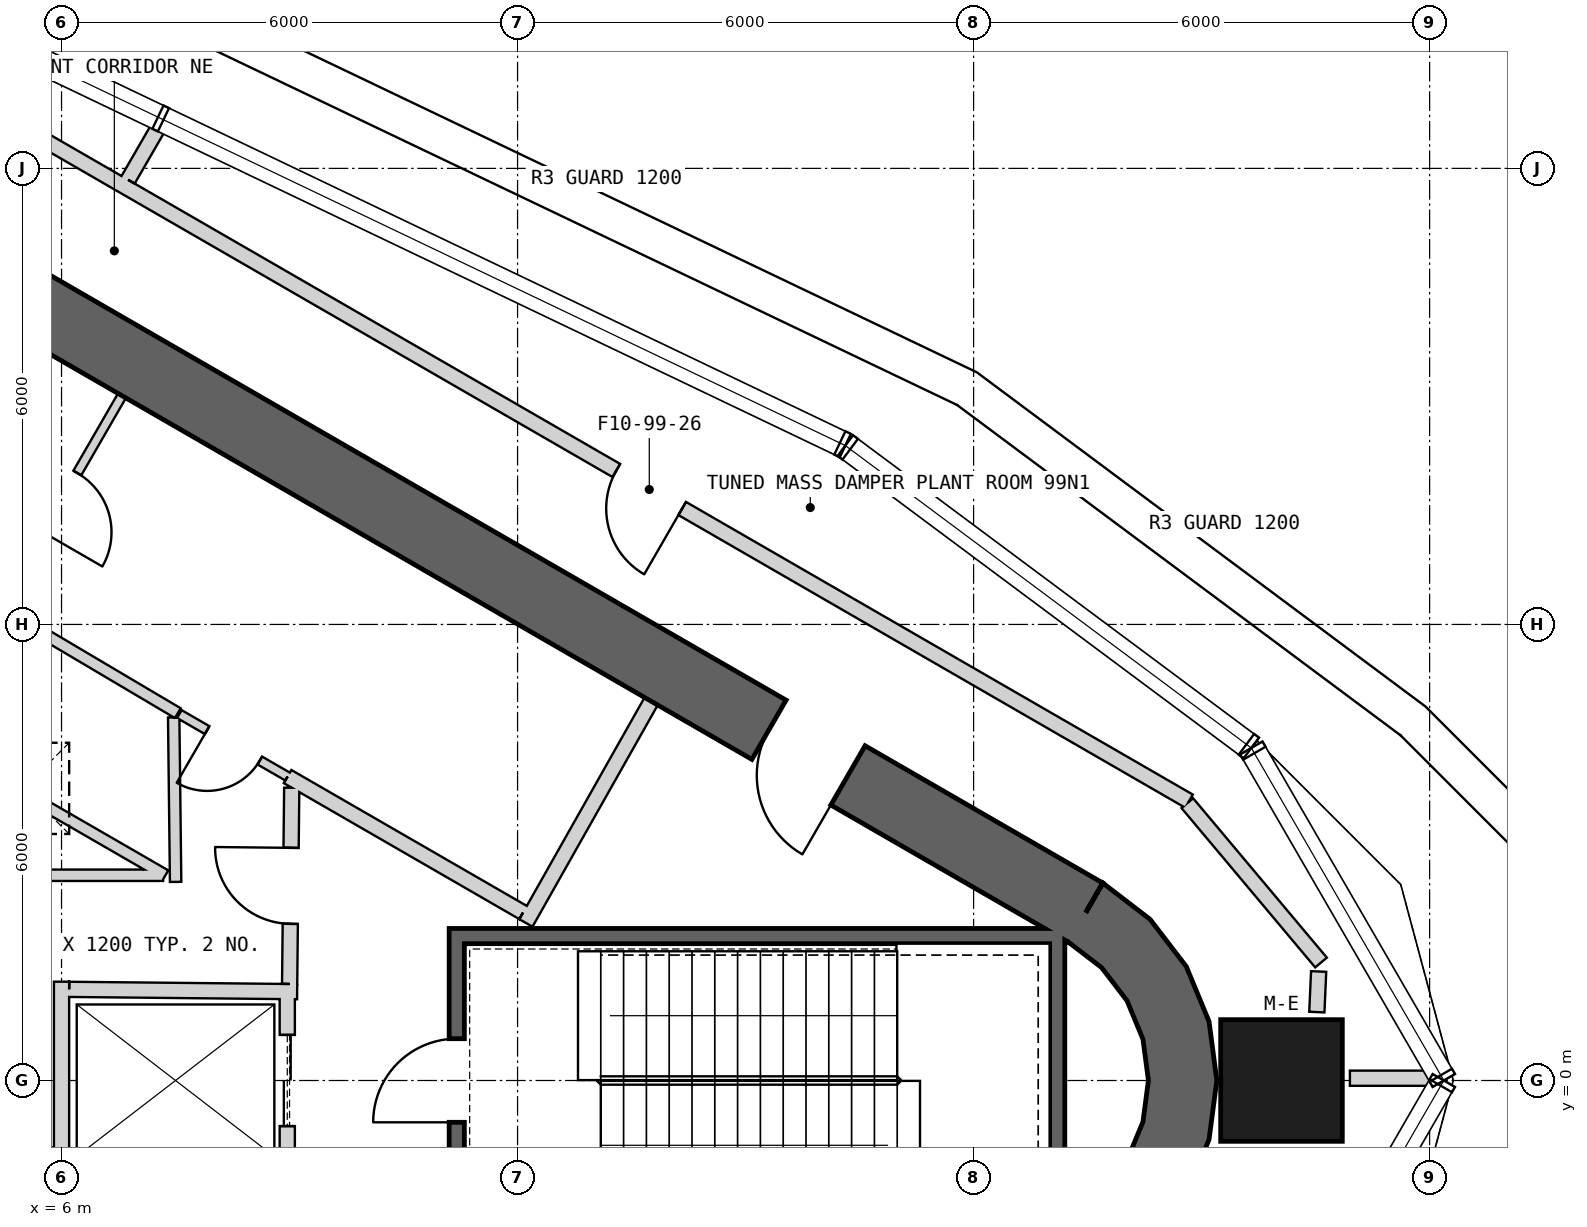
"""IFC4 building model, lengths in metres.
Left out: names, types, materials, properties, quantities, classifications, styles, units other than length and angle.
Written with IfcOpenShell. Run it as: python <this file> out.ifc"""

import sys

from ifc_helpers import new_model, si_unit, direction, frame, frame_2d, origin, origin_2d, place, context, subcontext, project, spatial, polyline, rectangle, outline, extrude, element, fill, save


model = new_model("IFC4")
c1 = context("Model", 3, precision=1e-05, world=origin(), true_north=direction((0.0, 1.0)))
c2 = subcontext(c1, "Body", "Model", "MODEL_VIEW")
j1 = project(units=[si_unit("LENGTHUNIT", "METRE"), si_unit("PLANEANGLEUNIT", "RADIAN")], contexts=[c1])
p1 = place(None, origin())
s1 = spatial("IfcSite", under=j1, at=p1, CompositionType="ELEMENT")
p2 = place(p1, origin())
s2 = spatial("IfcBuilding", under=s1, at=p2, CompositionType="ELEMENT")
p3 = place(p2, frame((0.0, 0.0, 440.3)))
s3 = spatial("IfcBuildingStorey", under=s2, at=p3, CompositionType="ELEMENT", Elevation=440.3)
p4 = place(p3, frame((22.051, 0.0, 0.0), z_axis=(0.0, 0.0, 1.0), x_axis=(1.0, 0.0, 0.0)))
e1 = element("IfcColumn", 1, at=p4, inside=s3, PredefinedType="COLUMN", context=c2, shape_type="SweptSolid", body=[
    extrude(rectangle(XDim=1.6, YDim=1.6, at=origin_2d()), origin(), (0.0, 0.0, 1.0), 4.7),
])
p5 = place(p3, frame((19.475, 2.208, 0.0), z_axis=(0.0, 0.0, 1.0), x_axis=(-0.866028369851, 0.499994862586, 0.0)))
e2 = element("IfcWall", 2, at=p5, inside=s3, PredefinedType="SHEAR", context=c2, shape_type="SweptSolid", body=[
    extrude(rectangle(XDim=31.523, YDim=0.9, at=frame_2d((15.762, 0.0))), origin(), (0.0, 0.0, 1.0), 4.7),
])
p6 = place(p5, frame((3.612, 0.0, 0.0)))
e3 = element("IfcOpeningElement", 3, at=p6, cuts=e2, PredefinedType="OPENING", context=c2, shape_type="SweptSolid", body=[
    extrude(rectangle(XDim=1.2, YDim=2.4, at=frame_2d((0.6, 1.2))), frame((0.0, 0.46, 0.0), z_axis=(0.0, -1.0, 0.0), x_axis=(1.0, 0.0, 0.0)), (0.0, 0.0, 1.0), 0.92),
])
p7 = place(p5, frame((26.712, 0.0, 0.0)))
e4 = element("IfcOpeningElement", 4, at=p7, cuts=e2, PredefinedType="OPENING", context=c2, shape_type="SweptSolid", body=[
    extrude(rectangle(XDim=1.2, YDim=2.4, at=frame_2d((0.6, 1.2))), frame((0.0, 0.46, 0.0), z_axis=(0.0, -1.0, 0.0), x_axis=(1.0, 0.0, 0.0)), (0.0, 0.0, 1.0), 0.92),
])
p8 = place(p3, origin())
e5 = element("IfcWall", 5, at=p8, inside=s3, PredefinedType="SHEAR", context=c2, shape_type="SweptSolid", body=[
    extrude(outline(polyline([(19.7, -2.598), (20.321, -2.121), (20.798, -1.5), (21.098, -0.777), (21.2, 0.0), (21.098, 0.777), (20.798, 1.5), (20.321, 2.121), (19.7, 2.598), (19.25, 1.819), (19.685, 1.485), (20.019, 1.05), (20.229, 0.543), (20.3, 0.0), (20.229, -0.543), (20.019, -1.05), (19.685, -1.485), (19.25, -1.819), (19.7, -2.598)])), origin(), (0.0, 0.0, 1.0), 4.7),
])
p9 = place(p3, frame((19.2, 1.9, -0.25), z_axis=(0.0, 0.0, 1.0), x_axis=(-1.0, 0.0, 0.0)))
e6 = element("IfcWall", 6, at=p9, inside=s3, PredefinedType="SHEAR", context=c2, shape_type="SweptSolid", body=[
    extrude(rectangle(XDim=8.1, YDim=0.2, at=frame_2d((4.05, 0.0))), origin(), (0.0, 0.0, 1.0), 4.95),
])
p10 = place(p3, frame((19.1, -2.0, -0.25), z_axis=(0.0, 0.0, 1.0), x_axis=(0.0, 1.0, 0.0)))
e7 = element("IfcWall", 7, at=p10, inside=s3, PredefinedType="SHEAR", context=c2, shape_type="SweptSolid", body=[
    extrude(rectangle(XDim=3.8, YDim=0.2, at=frame_2d((1.9, 0.0))), origin(), (0.0, 0.0, 1.0), 4.95),
])
p11 = place(p3, frame((11.2, -1.8, -0.25), z_axis=(0.0, 0.0, 1.0), x_axis=(0.0, 1.0, 0.0)))
e8 = element("IfcWall", 8, at=p11, inside=s3, PredefinedType="SHEAR", context=c2, shape_type="SweptSolid", body=[
    extrude(rectangle(XDim=3.6, YDim=0.2, at=frame_2d((1.8, 0.0))), origin(), (0.0, 0.0, 1.0), 4.95),
])
p12 = place(p11, frame((1.25, 0.0, 0.25)))
e9 = element("IfcOpeningElement", 9, at=p12, cuts=e8, PredefinedType="OPENING", context=c2, shape_type="SweptSolid", body=[
    extrude(rectangle(XDim=1.1, YDim=2.1, at=frame_2d((0.55, 1.05))), frame((0.0, 0.11, 0.0), z_axis=(0.0, -1.0, 0.0), x_axis=(1.0, 0.0, 0.0)), (0.0, 0.0, 1.0), 0.22),
])
p13 = place(p3, frame((8.97, 1.2, 0.0), z_axis=(0.0, 0.0, 1.0), x_axis=(0.0, -1.0, 0.0)))
e10 = element("IfcWall", 10, at=p13, inside=s3, PredefinedType="PLUMBINGWALL", context=c2, shape_type="SweptSolid", body=[
    extrude(rectangle(XDim=2.4, YDim=0.2, at=frame_2d((1.2, 0.0))), origin(), (0.0, 0.0, 1.0), 4.7),
])
p14 = place(p13, frame((0.6, 0.0, 0.0)))
e11 = element("IfcOpeningElement", 11, at=p14, cuts=e10, PredefinedType="OPENING", context=c2, shape_type="SweptSolid", body=[
    extrude(rectangle(XDim=1.2, YDim=2.4, at=frame_2d((0.6, 1.2))), frame((0.0, 0.11, 0.0), z_axis=(0.0, -1.0, 0.0), x_axis=(1.0, 0.0, 0.0)), (0.0, 0.0, 1.0), 0.22),
])
p15 = place(p3, frame((6.0, -1.1, 0.0), z_axis=(0.0, 0.0, 1.0), x_axis=(0.0, 1.0, 0.0)))
e12 = element("IfcWall", 12, at=p15, inside=s3, PredefinedType="PLUMBINGWALL", context=c2, shape_type="SweptSolid", body=[
    extrude(rectangle(XDim=2.4, YDim=0.2, at=frame_2d((1.2, 0.0))), origin(), (0.0, 0.0, 1.0), 4.7),
])
p16 = place(p3, frame((9.1, 1.169, 0.0), z_axis=(0.0, 0.0, 1.0), x_axis=(-0.99994990606, 0.010009264196, 0.0)))
e13 = element("IfcWall", 13, at=p16, inside=s3, PredefinedType="PLUMBINGWALL", context=c2, shape_type="SweptSolid", body=[
    extrude(rectangle(XDim=3.0, YDim=0.2, at=frame_2d((1.5, 0.0))), origin(), (0.0, 0.0, 1.0), 4.7),
])
p17 = place(p3, frame((6.795, 9.01, 0.0), z_axis=(0.0, 0.0, 1.0), x_axis=(-0.499984717929, -0.866034226713, 0.0)))
e14 = element("IfcWall", 14, at=p17, inside=s3, PredefinedType="PARTITIONING", context=c2, shape_type="SweptSolid", body=[
    extrude(rectangle(XDim=3.25, YDim=0.12, at=frame_2d((1.625, 0.0))), origin(), (0.0, 0.0, 1.0), 4.7),
])
p18 = place(p17, frame((1.175, 0.0, 0.0)))
e15 = element("IfcOpeningElement", 15, at=p18, cuts=e14, PredefinedType="OPENING", context=c2, shape_type="SweptSolid", body=[
    extrude(rectangle(XDim=0.9, YDim=2.1, at=frame_2d((0.45, 1.05))), frame((0.0, 0.07, 0.0), z_axis=(0.0, -1.0, 0.0), x_axis=(1.0, 0.0, 0.0)), (0.0, 0.0, 1.0), 0.14),
])
p19 = place(p3, frame((12.11, 2.073, 0.0), z_axis=(0.0, 0.0, 1.0), x_axis=(0.49196600604, 0.870614408852, 0.0)))
e16 = element("IfcWall", 16, at=p19, inside=s3, PredefinedType="PARTITIONING", context=c2, shape_type="SweptSolid", body=[
    extrude(rectangle(XDim=3.35, YDim=0.2, at=frame_2d((1.675, 0.0))), origin(), (0.0, 0.0, 1.0), 4.7),
])
p20 = place(p3, frame((8.974, 3.999, 0.0), z_axis=(0.0, 0.0, 1.0), x_axis=(0.86601284211, -0.500021756827, 0.0)))
e17 = element("IfcWall", 17, at=p20, inside=s3, PredefinedType="PARTITIONING", context=c2, shape_type="SweptSolid", body=[
    extrude(rectangle(XDim=3.577, YDim=0.2, at=frame_2d((1.789, 0.0))), origin(), (0.0, 0.0, 1.0), 4.7),
])
p21 = place(p3, frame((5.159, 6.236, 0.0), z_axis=(0.0, 0.0, 1.0), x_axis=(0.860550523279, -0.509365091938, 0.0)))
e18 = element("IfcWall", 18, at=p21, inside=s3, PredefinedType="PLUMBINGWALL", context=c2, shape_type="SweptSolid", body=[
    extrude(rectangle(XDim=2.755, YDim=0.15, at=frame_2d((1.377, 0.0))), origin(), (0.0, 0.0, 1.0), 4.7),
])
p22 = place(p3, frame((7.55, 4.821, 0.0), z_axis=(0.0, 0.0, 1.0), x_axis=(0.866069384335, -0.499923815713, 0.0)))
e19 = element("IfcWall", 19, at=p22, inside=s3, PredefinedType="PARTITIONING", context=c2, shape_type="SweptSolid", body=[
    extrude(rectangle(XDim=1.644, YDim=0.12, at=frame_2d((0.822, 0.0))), origin(), (0.0, 0.0, 1.0), 4.7),
])
p23 = place(p22, frame((0.422, 0.0, 0.0)))
e20 = element("IfcOpeningElement", 20, at=p23, cuts=e19, PredefinedType="OPENING", context=c2, shape_type="SweptSolid", body=[
    extrude(rectangle(XDim=0.8, YDim=2.1, at=frame_2d((0.4, 1.05))), frame((0.0, 0.07, 0.0), z_axis=(0.0, -1.0, 0.0), x_axis=(1.0, 0.0, 0.0)), (0.0, 0.0, 1.0), 0.14),
])
p24 = place(p3, frame((9.001, 1.27, 0.0), z_axis=(0.0, 0.0, 1.0), x_axis=(0.010780534828, 0.999941888346, 0.0)))
e21 = element("IfcWall", 21, at=p24, inside=s3, PredefinedType="PARTITIONING", context=c2, shape_type="SweptSolid", body=[
    extrude(rectangle(XDim=2.582, YDim=0.2, at=frame_2d((1.291, 0.0))), origin(), (0.0, 0.0, 1.0), 4.7),
])
p25 = place(p24, frame((0.791, 0.0, 0.0)))
e22 = element("IfcOpeningElement", 22, at=p25, cuts=e21, PredefinedType="OPENING", context=c2, shape_type="SweptSolid", body=[
    extrude(rectangle(XDim=1.0, YDim=2.1, at=frame_2d((0.5, 1.05))), frame((0.0, 0.11, 0.0), z_axis=(0.0, -1.0, 0.0), x_axis=(1.0, 0.0, 0.0)), (0.0, 0.0, 1.0), 0.22),
])
p26 = place(p3, frame((5.9, -0.954, 0.0), z_axis=(0.0, 0.0, 1.0), x_axis=(-0.999979813999, 0.006353864523, 0.0)))
e23 = element("IfcWall", 23, at=p26, inside=s3, PredefinedType="PLUMBINGWALL", context=c2, shape_type="SweptSolid", body=[
    extrude(rectangle(XDim=4.534, YDim=0.15, at=frame_2d((2.267, 0.0))), origin(), (0.0, 0.0, 1.0), 4.7),
])
p27 = place(p26, frame((1.867, 0.0, 0.0)))
e24 = element("IfcOpeningElement", 24, at=p27, cuts=e23, PredefinedType="OPENING", context=c2, shape_type="SweptSolid", body=[
    extrude(rectangle(XDim=0.8, YDim=2.1, at=frame_2d((0.4, 1.05))), frame((0.0, 0.085, 0.0), z_axis=(0.0, -1.0, 0.0), x_axis=(1.0, 0.0, 0.0)), (0.0, 0.0, 1.0), 0.17),
])
p28 = place(p3, frame((7.367, 2.7, 0.0), z_axis=(0.0, 0.0, 1.0), x_axis=(-0.866027158831, 0.499996960157, 0.0)))
e25 = element("IfcWall", 25, at=p28, inside=s3, PredefinedType="PLUMBINGWALL", context=c2, shape_type="SweptSolid", body=[
    extrude(rectangle(XDim=10.06, YDim=0.15, at=frame_2d((5.03, 0.0))), origin(), (0.0, 0.0, 1.0), 4.7),
])
p29 = place(p3, frame((7.501, 2.613, 0.0), z_axis=(0.0, 0.0, 1.0), x_axis=(-0.011734691853, 0.999931146133, 0.0)))
e26 = element("IfcWall", 26, at=p29, inside=s3, PredefinedType="PLUMBINGWALL", context=c2, shape_type="SweptSolid", body=[
    extrude(rectangle(XDim=2.164, YDim=0.15, at=frame_2d((1.082, 0.0))), origin(), (0.0, 0.0, 1.0), 4.7),
])
p30 = place(p3, frame((4.425, 2.7, 0.0), z_axis=(0.0, 0.0, 1.0), x_axis=(1.0, 0.0, 0.0)))
e27 = element("IfcWall", 27, at=p30, inside=s3, PredefinedType="PLUMBINGWALL", context=c2, shape_type="SweptSolid", body=[
    extrude(rectangle(XDim=2.912, YDim=0.15, at=frame_2d((1.456, 0.0))), origin(), (0.0, 0.0, 1.0), 4.7),
])
p31 = place(p3, frame((22.951, 0.03, 0.0), z_axis=(0.0, 0.0, 1.0), x_axis=(1.0, 0.0, 0.0)))
e28 = element("IfcWall", 28, at=p31, inside=s3, PredefinedType="PARTITIONING", context=c2, shape_type="SweptSolid", body=[
    extrude(rectangle(XDim=1.098, YDim=0.2, at=frame_2d((0.549, 0.0))), origin(), (0.0, 0.0, 1.0), 4.7),
])
p32 = place(p3, frame((20.834, 3.675, 0.0), z_axis=(0.0, 0.0, 1.0), x_axis=(-0.866028536494, 0.499994573949, 0.0)))
e29 = element("IfcWall", 29, at=p32, inside=s3, PredefinedType="PARTITIONING", context=c2, shape_type="SweptSolid", body=[
    extrude(rectangle(XDim=32.411, YDim=0.2, at=frame_2d((16.206, 0.0))), origin(), (0.0, 0.0, 1.0), 4.7),
])
p33 = place(p32, frame((7.7, 0.0, 0.0)))
e30 = element("IfcOpeningElement", 30, at=p33, cuts=e29, PredefinedType="OPENING", context=c2, shape_type="SweptSolid", body=[
    extrude(rectangle(XDim=1.0, YDim=2.1, at=frame_2d((0.5, 1.05))), frame((0.0, 0.11, 0.0), z_axis=(0.0, -1.0, 0.0), x_axis=(1.0, 0.0, 0.0)), (0.0, 0.0, 1.0), 0.22),
])
p34 = place(p32, frame((18.006, 0.0, 0.0)))
e31 = element("IfcOpeningElement", 31, at=p34, cuts=e29, PredefinedType="OPENING", context=c2, shape_type="SweptSolid", body=[
    extrude(rectangle(XDim=1.0, YDim=2.1, at=frame_2d((0.5, 1.05))), frame((0.0, 0.11, 0.0), z_axis=(0.0, -1.0, 0.0), x_axis=(1.0, 0.0, 0.0)), (0.0, 0.0, 1.0), 0.22),
])
p35 = place(p3, frame((22.571, 1.552, 0.0), z_axis=(0.0, 0.0, 1.0), x_axis=(-0.642777788023, 0.766052684366, 0.0)))
e32 = element("IfcWall", 32, at=p35, inside=s3, PredefinedType="PARTITIONING", context=c2, shape_type="SweptSolid", body=[
    extrude(rectangle(XDim=2.737, YDim=0.2, at=frame_2d((1.369, 0.0))), origin(), (0.0, 0.0, 1.0), 4.7),
])
p36 = place(p3, frame((22.516, 0.9, 0.0), z_axis=(0.0, 0.0, 1.0), x_axis=(0.044289222506, 0.99901875096, 0.0)))
e33 = element("IfcWall", 33, at=p36, inside=s3, PredefinedType="PARTITIONING", context=c2, shape_type="SweptSolid", body=[
    extrude(rectangle(XDim=0.535, YDim=0.2, at=frame_2d((0.267, 0.0))), origin(), (0.0, 0.0, 1.0), 4.7),
])
p37 = place(p3, frame((7.271, 12.534, 0.0), z_axis=(0.0, 0.0, 1.0), x_axis=(-0.500025443912, -0.866010713236, 0.0)))
e34 = element("IfcWall", 34, at=p37, inside=s3, PredefinedType="PARTITIONING", context=c2, shape_type="SweptSolid", body=[
    extrude(rectangle(XDim=0.791, YDim=0.2, at=frame_2d((0.395, 0.0))), origin(), (0.0, 0.0, 1.0), 4.7),
])
p38 = place(p2, frame((0.0, 0.0, 445.3)))
p39 = place(p38, frame((0.0, 0.0, -0.3)))
p40 = place(p39, frame((5.5, 3.843, 0.0)))
p41 = place(p40, frame((0.0, 0.0, 0.25)))
e35 = element("IfcWindow", 35, at=p41, inside=s3, PartitioningType="SINGLE_PANEL", PredefinedType="SKYLIGHT", context=c2, shape_type="SweptSolid", body=[
    extrude(rectangle(XDim=1.2, YDim=1.2, at=origin_2d()), origin(), (0.0, 0.0, 1.0), 0.05),
])
p42 = place(p12, origin())
e36 = element("IfcDoor", 36, at=p42, inside=s3, OperationType="SINGLE_SWING_LEFT", PredefinedType="USERDEFINED", context=c2, shape_type="SweptSolid", body=[
    extrude(rectangle(XDim=1.1, YDim=2.1, at=frame_2d((0.55, 1.05))), frame((0.0, 0.025, 0.0), z_axis=(0.0, -1.0, 0.0), x_axis=(1.0, 0.0, 0.0)), (0.0, 0.0, 1.0), 0.05),
])
fill(e9, e36)
p43 = place(p25, origin())
e37 = element("IfcDoor", 37, at=p43, inside=s3, OperationType="SINGLE_SWING_RIGHT", PredefinedType="USERDEFINED", context=c2, shape_type="SweptSolid", body=[
    extrude(rectangle(XDim=1.0, YDim=2.1, at=frame_2d((0.5, 1.05))), frame((0.0, 0.025, 0.0), z_axis=(0.0, -1.0, 0.0), x_axis=(1.0, 0.0, 0.0)), (0.0, 0.0, 1.0), 0.05),
])
fill(e22, e37)
p44 = place(p14, origin())
e38 = element("IfcDoor", 38, at=p44, inside=s3, OperationType="SLIDING_TO_LEFT", PredefinedType="USERDEFINED", context=c2, shape_type="SweptSolid", body=[
    extrude(rectangle(XDim=1.2, YDim=2.4, at=frame_2d((0.6, 1.2))), frame((0.0, 0.025, 0.0), z_axis=(0.0, -1.0, 0.0), x_axis=(1.0, 0.0, 0.0)), (0.0, 0.0, 1.0), 0.05),
])
fill(e11, e38)
p45 = place(p23, origin())
e39 = element("IfcDoor", 39, at=p45, inside=s3, OperationType="SINGLE_SWING_LEFT", PredefinedType="USERDEFINED", context=c2, shape_type="SweptSolid", body=[
    extrude(rectangle(XDim=0.8, YDim=2.1, at=frame_2d((0.4, 1.05))), frame((0.0, 0.025, 0.0), z_axis=(0.0, -1.0, 0.0), x_axis=(1.0, 0.0, 0.0)), (0.0, 0.0, 1.0), 0.05),
])
fill(e20, e39)
p46 = place(p33, origin())
e40 = element("IfcDoor", 40, at=p46, inside=s3, OperationType="SINGLE_SWING_LEFT", PredefinedType="USERDEFINED", context=c2, shape_type="SweptSolid", body=[
    extrude(rectangle(XDim=1.0, YDim=2.1, at=frame_2d((0.5, 1.05))), frame((0.0, 0.025, 0.0), z_axis=(0.0, -1.0, 0.0), x_axis=(1.0, 0.0, 0.0)), (0.0, 0.0, 1.0), 0.05),
])
fill(e30, e40)
p47 = place(p18, origin())
e41 = element("IfcDoor", 41, at=p47, inside=s3, OperationType="SINGLE_SWING_RIGHT", PredefinedType="NOTDEFINED", context=c2, shape_type="SweptSolid", body=[
    extrude(rectangle(XDim=0.9, YDim=2.1, at=frame_2d((0.45, 1.05))), frame((0.0, 0.025, 0.0), z_axis=(0.0, -1.0, 0.0), x_axis=(1.0, 0.0, 0.0)), (0.0, 0.0, 1.0), 0.05),
])
fill(e15, e41)
p48 = place(p6, origin())
e42 = element("IfcDoor", 42, at=p48, inside=s3, OperationType="SINGLE_SWING_LEFT", PredefinedType="USERDEFINED", context=c2, shape_type="SweptSolid", body=[
    extrude(rectangle(XDim=1.2, YDim=2.4, at=frame_2d((0.6, 1.2))), frame((0.0, 0.025, 0.0), z_axis=(0.0, -1.0, 0.0), x_axis=(1.0, 0.0, 0.0)), (0.0, 0.0, 1.0), 0.05),
])
fill(e3, e42)
save(model, sys.argv[1])
